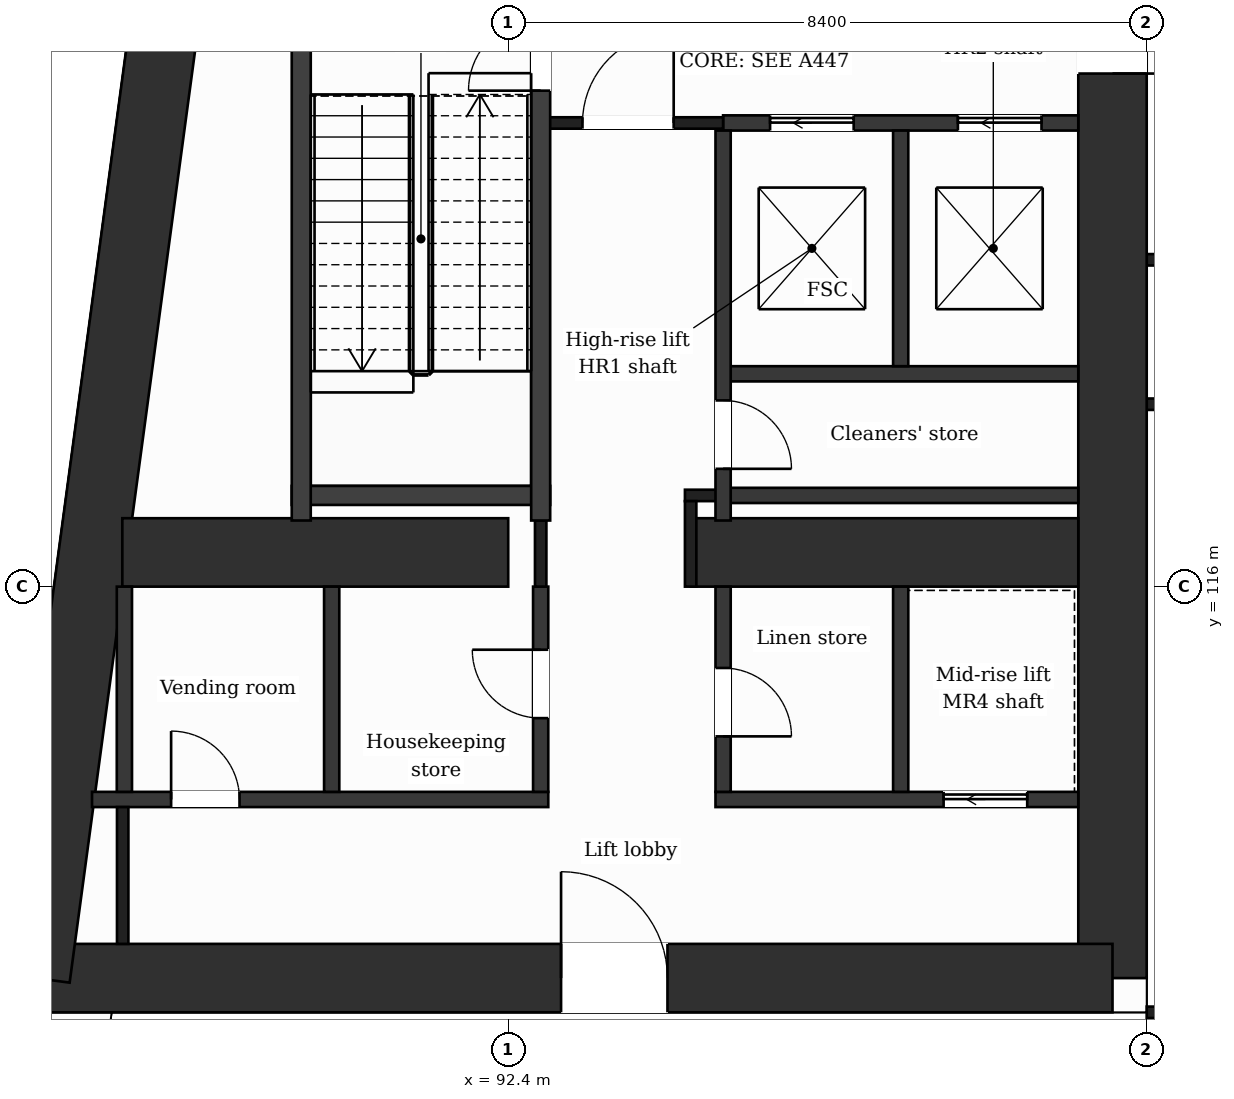
"""IFC4 building model, lengths in metres.
Left out: names, types, materials, properties, quantities, classifications, styles, units other than length and angle.
Written with IfcOpenShell. Run it as: python <this file> out.ifc"""

import sys

from ifc_helpers import new_model, si_unit, direction, frame, frame_2d, origin, place, context, subcontext, project, spatial, rectangle, extrude, element, fill, save


model = new_model("IFC4")
c1 = context("Model", 3, precision=1e-05, world=origin(), true_north=direction((0.0, 1.0)))
c2 = subcontext(c1, "Body", "Model", "MODEL_VIEW")
j1 = project(units=[si_unit("LENGTHUNIT", "METRE"), si_unit("PLANEANGLEUNIT", "RADIAN")], contexts=[c1])
p1 = place(None, origin())
s1 = spatial("IfcSite", under=j1, at=p1, CompositionType="ELEMENT")
p2 = place(p1, origin())
s2 = spatial("IfcBuilding", under=s1, at=p2, CompositionType="ELEMENT")
p3 = place(p2, frame((0.0, 0.0, 192.2)))
s3 = spatial("IfcBuildingStorey", under=s2, at=p3, CompositionType="ELEMENT", Elevation=192.2)
p4 = place(p3, frame((100.35, 131.95, 0.0), z_axis=(0.0, 0.0, 1.0), x_axis=(0.0, -1.0, 0.0)))
e1 = element("IfcWall", 1, at=p4, inside=s3, PredefinedType="SHEAR", context=c2, shape_type="SweptSolid", body=[
    extrude(rectangle(XDim=21.1, YDim=0.9, at=frame_2d((10.55, 0.0))), origin(), (0.0, 0.0, 1.0), 5.0),
])
p5 = place(p4, frame((7.8, 0.0, 0.0)))
e2 = element("IfcOpeningElement", 2, at=p5, cuts=e1, PredefinedType="OPENING", context=c2, shape_type="SweptSolid", body=[
    extrude(rectangle(XDim=1.4, YDim=2.1, at=frame_2d((0.7, 1.05))), frame((0.0, 0.46, 0.0), z_axis=(0.0, -1.0, 0.0), x_axis=(1.0, 0.0, 0.0)), (0.0, 0.0, 1.0), 0.92),
])
p6 = place(p3, frame((100.35, 110.85, 0.0), z_axis=(0.0, 0.0, 1.0), x_axis=(-1.0, 0.0, 0.0)))
e3 = element("IfcWall", 3, at=p6, inside=s3, PredefinedType="SHEAR", context=c2, shape_type="SweptSolid", body=[
    extrude(rectangle(XDim=14.166, YDim=0.9, at=frame_2d((7.083, 0.0))), origin(), (0.0, 0.0, 1.0), 5.0),
])
p7 = place(p6, frame((5.855, 0.0, 0.0)))
e4 = element("IfcOpeningElement", 4, at=p7, cuts=e3, PredefinedType="OPENING", context=c2, shape_type="SweptSolid", body=[
    extrude(rectangle(XDim=1.4, YDim=2.1, at=frame_2d((0.7, 1.05))), frame((0.0, 0.46, 0.0), z_axis=(0.0, -1.0, 0.0), x_axis=(1.0, 0.0, 0.0)), (0.0, 0.0, 1.0), 0.92),
])
p8 = place(p3, frame((86.184, 110.85, 0.0), z_axis=(0.0, 0.0, 1.0), x_axis=(0.133410495943, 0.991060865725, 0.0)))
e5 = element("IfcWall", 5, at=p8, inside=s3, PredefinedType="SHEAR", context=c2, shape_type="SweptSolid", body=[
    extrude(rectangle(XDim=21.29, YDim=0.9, at=frame_2d((10.645, 0.0))), origin(), (0.0, 0.0, 1.0), 5.0),
])
p9 = place(p3, frame((87.323, 116.45, 0.0), z_axis=(0.0, 0.0, 1.0), x_axis=(1.0, 0.0, 0.0)))
e6 = element("IfcWall", 6, at=p9, inside=s3, PredefinedType="SHEAR", context=c2, shape_type="SweptSolid", body=[
    extrude(rectangle(XDim=5.077, YDim=0.9, at=frame_2d((2.539, 0.0))), origin(), (0.0, 0.0, 1.0), 5.0),
])
p10 = place(p3, frame((94.8, 116.45, 0.0), z_axis=(0.0, 0.0, 1.0), x_axis=(1.0, 0.0, 0.0)))
e7 = element("IfcWall", 7, at=p10, inside=s3, PredefinedType="SHEAR", context=c2, shape_type="SweptSolid", body=[
    extrude(rectangle(XDim=5.1, YDim=0.9, at=frame_2d((2.55, 0.0))), origin(), (0.0, 0.0, 1.0), 5.0),
])
p11 = place(p3, frame((100.8, 110.4, 0.0), z_axis=(0.0, 0.0, 1.0), x_axis=(1.0, 0.0, 0.0)))
e8 = element("IfcWall", 8, at=p11, inside=s3, PredefinedType="PARTITIONING", context=c2, shape_type="SweptSolid", body=[
    extrude(rectangle(XDim=4.2, YDim=0.15, at=frame_2d((2.1, 0.0))), origin(), (0.0, 0.0, 1.0), 4.5),
])
p12 = place(p3, frame((86.924, 113.2, 0.0), z_axis=(0.0, 0.0, 1.0), x_axis=(1.0, 0.0, 0.0)))
e9 = element("IfcWall", 9, at=p12, inside=s3, PredefinedType="PARTITIONING", context=c2, shape_type="SweptSolid", body=[
    extrude(rectangle(XDim=6.003, YDim=0.2, at=frame_2d((3.001, 0.0))), origin(), (0.0, 0.0, 1.0), 4.5),
])
p13 = place(p12, frame((1.041, 0.0, 0.0)))
e10 = element("IfcOpeningElement", 10, at=p13, cuts=e9, PredefinedType="OPENING", context=c2, shape_type="SweptSolid", body=[
    extrude(rectangle(XDim=0.9, YDim=2.1, at=frame_2d((0.45, 1.05))), frame((0.0, 0.11, 0.0), z_axis=(0.0, -1.0, 0.0), x_axis=(1.0, 0.0, 0.0)), (0.0, 0.0, 1.0), 0.22),
])
p14 = place(p3, frame((95.127, 113.2, 0.0), z_axis=(0.0, 0.0, 1.0), x_axis=(1.0, 0.0, 0.0)))
e11 = element("IfcWall", 11, at=p14, inside=s3, PredefinedType="PARTITIONING", context=c2, shape_type="SweptSolid", body=[
    extrude(rectangle(XDim=4.773, YDim=0.2, at=frame_2d((2.386, 0.0))), origin(), (0.0, 0.0, 1.0), 4.5),
])
p15 = place(p14, frame((3.001, 0.0, 0.0)))
e12 = element("IfcOpeningElement", 12, at=p15, cuts=e11, PredefinedType="OPENING", context=c2, shape_type="SweptSolid", body=[
    extrude(rectangle(XDim=1.1, YDim=2.1, at=frame_2d((0.55, 1.05))), frame((0.0, 0.11, 0.0), z_axis=(0.0, -1.0, 0.0), x_axis=(1.0, 0.0, 0.0)), (0.0, 0.0, 1.0), 0.22),
])
p16 = place(p3, frame((95.227, 117.2, 0.0), z_axis=(0.0, 0.0, 1.0), x_axis=(1.0, 0.0, 0.0)))
e13 = element("IfcWall", 13, at=p16, inside=s3, PredefinedType="PARTITIONING", context=c2, shape_type="SweptSolid", body=[
    extrude(rectangle(XDim=4.673, YDim=0.2, at=frame_2d((2.336, 0.0))), origin(), (0.0, 0.0, 1.0), 4.5),
])
p17 = place(p3, frame((94.725, 117.2, 0.0), z_axis=(0.0, 0.0, 1.0), x_axis=(1.0, 0.0, 0.0)))
e14 = element("IfcWall", 14, at=p17, inside=s3, PredefinedType="PARTITIONING", context=c2, shape_type="SweptSolid", body=[
    extrude(rectangle(XDim=0.502, YDim=0.15, at=frame_2d((0.251, 0.0))), origin(), (0.0, 0.0, 1.0), 4.5),
])
p18 = place(p3, frame((89.552, 117.2, 0.0), z_axis=(0.0, 0.0, 1.0), x_axis=(1.0, 0.0, 0.0)))
e15 = element("IfcWall", 15, at=p18, inside=s3, PredefinedType="PARTITIONING", context=c2, shape_type="SweptSolid", body=[
    extrude(rectangle(XDim=3.4, YDim=0.25, at=frame_2d((1.7, 0.0))), origin(), (0.0, 0.0, 1.0), 4.5),
])
p19 = place(p3, frame((100.8, 118.4, 0.0), z_axis=(0.0, 0.0, 1.0), x_axis=(1.0, 0.0, 0.0)))
e16 = element("IfcWall", 16, at=p19, inside=s3, PredefinedType="PARTITIONING", context=c2, shape_type="SweptSolid", body=[
    extrude(rectangle(XDim=4.275, YDim=0.15, at=frame_2d((2.137, 0.0))), origin(), (0.0, 0.0, 1.0), 4.5),
])
p20 = place(p3, frame((95.227, 118.8, 0.0), z_axis=(0.0, 0.0, 1.0), x_axis=(1.0, 0.0, 0.0)))
e17 = element("IfcWall", 17, at=p20, inside=s3, PredefinedType="PARTITIONING", context=c2, shape_type="SweptSolid", body=[
    extrude(rectangle(XDim=4.673, YDim=0.2, at=frame_2d((2.336, 0.0))), origin(), (0.0, 0.0, 1.0), 4.5),
])
p21 = place(p3, frame((100.8, 120.3, 0.0), z_axis=(0.0, 0.0, 1.0), x_axis=(1.0, 0.0, 0.0)))
e18 = element("IfcWall", 18, at=p21, inside=s3, PredefinedType="PARTITIONING", context=c2, shape_type="SweptSolid", body=[
    extrude(rectangle(XDim=7.275, YDim=0.15, at=frame_2d((3.637, 0.0))), origin(), (0.0, 0.0, 1.0), 4.5),
])
p22 = place(p21, frame((3.0, 0.0, 0.0)))
e19 = element("IfcOpeningElement", 19, at=p22, cuts=e18, PredefinedType="OPENING", context=c2, shape_type="SweptSolid", body=[
    extrude(rectangle(XDim=1.2, YDim=2.1, at=frame_2d((0.6, 1.05))), frame((0.0, 0.085, 0.0), z_axis=(0.0, -1.0, 0.0), x_axis=(1.0, 0.0, 0.0)), (0.0, 0.0, 1.0), 0.17),
])
p23 = place(p3, frame((95.227, 122.1, 0.0), z_axis=(0.0, 0.0, 1.0), x_axis=(1.0, 0.0, 0.0)))
e20 = element("IfcWall", 20, at=p23, inside=s3, PredefinedType="PARTITIONING", context=c2, shape_type="SweptSolid", body=[
    extrude(rectangle(XDim=4.673, YDim=0.2, at=frame_2d((2.336, 0.0))), origin(), (0.0, 0.0, 1.0), 4.5),
])
p24 = place(p23, frame((0.618, 0.0, 0.0)))
e21 = element("IfcOpeningElement", 21, at=p24, cuts=e20, PredefinedType="OPENING", context=c2, shape_type="SweptSolid", body=[
    extrude(rectangle(XDim=1.1, YDim=2.1, at=frame_2d((0.55, 1.05))), frame((0.0, 0.11, 0.0), z_axis=(0.0, -1.0, 0.0), x_axis=(1.0, 0.0, 0.0)), (0.0, 0.0, 1.0), 0.22),
])
p25 = place(p23, frame((3.089, 0.0, 0.0)))
e22 = element("IfcOpeningElement", 22, at=p25, cuts=e20, PredefinedType="OPENING", context=c2, shape_type="SweptSolid", body=[
    extrude(rectangle(XDim=1.1, YDim=2.1, at=frame_2d((0.55, 1.05))), frame((0.0, 0.11, 0.0), z_axis=(0.0, -1.0, 0.0), x_axis=(1.0, 0.0, 0.0)), (0.0, 0.0, 1.0), 0.22),
])
p26 = place(p3, frame((92.827, 122.1, 0.0), z_axis=(0.0, 0.0, 1.0), x_axis=(1.0, 0.0, 0.0)))
e23 = element("IfcWall", 23, at=p26, inside=s3, PredefinedType="PARTITIONING", context=c2, shape_type="SweptSolid", body=[
    extrude(rectangle(XDim=2.4, YDim=0.15, at=frame_2d((1.2, 0.0))), origin(), (0.0, 0.0, 1.0), 4.5),
])
p27 = place(p26, frame((0.55, 0.0, 0.0)))
e24 = element("IfcOpeningElement", 24, at=p27, cuts=e23, PredefinedType="OPENING", context=c2, shape_type="SweptSolid", body=[
    extrude(rectangle(XDim=1.2, YDim=2.1, at=frame_2d((0.6, 1.05))), frame((0.0, 0.085, 0.0), z_axis=(0.0, -1.0, 0.0), x_axis=(1.0, 0.0, 0.0)), (0.0, 0.0, 1.0), 0.17),
])
p28 = place(p3, frame((87.35, 113.3, 0.0), z_axis=(0.0, 0.0, 1.0), x_axis=(0.0, 1.0, 0.0)))
e25 = element("IfcWall", 25, at=p28, inside=s3, PredefinedType="PARTITIONING", context=c2, shape_type="SweptSolid", body=[
    extrude(rectangle(XDim=2.7, YDim=0.2, at=frame_2d((1.35, 0.0))), origin(), (0.0, 0.0, 1.0), 4.5),
])
p29 = place(p3, frame((87.328, 111.3, 0.0), z_axis=(0.0, 0.0, 1.0), x_axis=(0.0, 1.0, 0.0)))
e26 = element("IfcWall", 26, at=p29, inside=s3, PredefinedType="PARTITIONING", context=c2, shape_type="SweptSolid", body=[
    extrude(rectangle(XDim=1.8, YDim=0.15, at=frame_2d((0.9, 0.0))), origin(), (0.0, 0.0, 1.0), 4.5),
])
p30 = place(p3, frame((89.677, 116.87, 0.0), z_axis=(0.0, 0.0, 1.0), x_axis=(0.0, 1.0, 0.0)))
e27 = element("IfcWall", 27, at=p30, inside=s3, PredefinedType="PARTITIONING", context=c2, shape_type="SweptSolid", body=[
    extrude(rectangle(XDim=6.955, YDim=0.25, at=frame_2d((3.478, 0.0))), origin(), (0.0, 0.0, 1.0), 4.5),
])
p31 = place(p3, frame((90.077, 113.3, 0.0), z_axis=(0.0, 0.0, 1.0), x_axis=(0.0, 1.0, 0.0)))
e28 = element("IfcWall", 28, at=p31, inside=s3, PredefinedType="PARTITIONING", context=c2, shape_type="SweptSolid", body=[
    extrude(rectangle(XDim=2.7, YDim=0.2, at=frame_2d((1.35, 0.0))), origin(), (0.0, 0.0, 1.0), 4.5),
])
p32 = place(p3, frame((92.827, 113.3, 0.0), z_axis=(0.0, 0.0, 1.0), x_axis=(0.0, 1.0, 0.0)))
e29 = element("IfcWall", 29, at=p32, inside=s3, PredefinedType="PARTITIONING", context=c2, shape_type="SweptSolid", body=[
    extrude(rectangle(XDim=2.7, YDim=0.2, at=frame_2d((1.35, 0.0))), origin(), (0.0, 0.0, 1.0), 4.5),
])
p33 = place(p32, frame((0.97, 0.0, 0.0)))
e30 = element("IfcOpeningElement", 30, at=p33, cuts=e29, PredefinedType="OPENING", context=c2, shape_type="SweptSolid", body=[
    extrude(rectangle(XDim=0.9, YDim=2.1, at=frame_2d((0.45, 1.05))), frame((0.0, 0.11, 0.0), z_axis=(0.0, -1.0, 0.0), x_axis=(1.0, 0.0, 0.0)), (0.0, 0.0, 1.0), 0.22),
])
p34 = place(p3, frame((92.827, 116.0, 0.0), z_axis=(0.0, 0.0, 1.0), x_axis=(0.0, 1.0, 0.0)))
e31 = element("IfcWall", 31, at=p34, inside=s3, PredefinedType="PARTITIONING", context=c2, shape_type="SweptSolid", body=[
    extrude(rectangle(XDim=0.87, YDim=0.15, at=frame_2d((0.435, 0.0))), origin(), (0.0, 0.0, 1.0), 4.5),
])
p35 = place(p3, frame((92.827, 116.87, 0.0), z_axis=(0.0, 0.0, 1.0), x_axis=(0.0, 1.0, 0.0)))
e32 = element("IfcWall", 32, at=p35, inside=s3, PredefinedType="PARTITIONING", context=c2, shape_type="SweptSolid", body=[
    extrude(rectangle(XDim=6.955, YDim=0.25, at=frame_2d((3.478, 0.0))), origin(), (0.0, 0.0, 1.0), 4.5),
])
p36 = place(p35, frame((5.655, 0.0, 0.0)))
e33 = element("IfcOpeningElement", 33, at=p36, cuts=e32, PredefinedType="OPENING", context=c2, shape_type="SweptSolid", body=[
    extrude(rectangle(XDim=0.95, YDim=2.1, at=frame_2d((0.475, 1.05))), frame((0.0, 0.135, 0.0), z_axis=(0.0, -1.0, 0.0), x_axis=(1.0, 0.0, 0.0)), (0.0, 0.0, 1.0), 0.27),
])
p37 = place(p3, frame((94.8, 116.0, 0.0), z_axis=(0.0, 0.0, 1.0), x_axis=(0.0, 1.0, 0.0)))
e34 = element("IfcWall", 34, at=p37, inside=s3, PredefinedType="PARTITIONING", context=c2, shape_type="SweptSolid", body=[
    extrude(rectangle(XDim=1.125, YDim=0.15, at=frame_2d((0.562, 0.0))), origin(), (0.0, 0.0, 1.0), 4.5),
])
p38 = place(p3, frame((95.227, 113.3, 0.0), z_axis=(0.0, 0.0, 1.0), x_axis=(0.0, 1.0, 0.0)))
e35 = element("IfcWall", 35, at=p38, inside=s3, PredefinedType="PARTITIONING", context=c2, shape_type="SweptSolid", body=[
    extrude(rectangle(XDim=2.7, YDim=0.2, at=frame_2d((1.35, 0.0))), origin(), (0.0, 0.0, 1.0), 4.5),
])
p39 = place(p38, frame((0.73, 0.0, 0.0)))
e36 = element("IfcOpeningElement", 36, at=p39, cuts=e35, PredefinedType="OPENING", context=c2, shape_type="SweptSolid", body=[
    extrude(rectangle(XDim=0.9, YDim=2.1, at=frame_2d((0.45, 1.05))), frame((0.0, 0.11, 0.0), z_axis=(0.0, -1.0, 0.0), x_axis=(1.0, 0.0, 0.0)), (0.0, 0.0, 1.0), 0.22),
])
p40 = place(p3, frame((95.227, 116.87, 0.0), z_axis=(0.0, 0.0, 1.0), x_axis=(0.0, 1.0, 0.0)))
e37 = element("IfcWall", 37, at=p40, inside=s3, PredefinedType="PARTITIONING", context=c2, shape_type="SweptSolid", body=[
    extrude(rectangle(XDim=5.13, YDim=0.2, at=frame_2d((2.565, 0.0))), origin(), (0.0, 0.0, 1.0), 4.5),
])
p41 = place(p40, frame((0.68, 0.0, 0.0)))
e38 = element("IfcOpeningElement", 38, at=p41, cuts=e37, PredefinedType="OPENING", context=c2, shape_type="SweptSolid", body=[
    extrude(rectangle(XDim=0.9, YDim=2.1, at=frame_2d((0.45, 1.05))), frame((0.0, 0.11, 0.0), z_axis=(0.0, -1.0, 0.0), x_axis=(1.0, 0.0, 0.0)), (0.0, 0.0, 1.0), 0.22),
])
p42 = place(p3, frame((97.563, 113.3, 0.0), z_axis=(0.0, 0.0, 1.0), x_axis=(0.0, 1.0, 0.0)))
e39 = element("IfcWall", 39, at=p42, inside=s3, PredefinedType="PARTITIONING", context=c2, shape_type="SweptSolid", body=[
    extrude(rectangle(XDim=2.7, YDim=0.2, at=frame_2d((1.35, 0.0))), origin(), (0.0, 0.0, 1.0), 4.5),
])
p43 = place(p3, frame((97.563, 118.9, 0.0), z_axis=(0.0, 0.0, 1.0), x_axis=(0.0, 1.0, 0.0)))
e40 = element("IfcWall", 40, at=p43, inside=s3, PredefinedType="PARTITIONING", context=c2, shape_type="SweptSolid", body=[
    extrude(rectangle(XDim=3.1, YDim=0.2, at=frame_2d((1.55, 0.0))), origin(), (0.0, 0.0, 1.0), 4.5),
])
p44 = place(p27, origin())
e41 = element("IfcDoor", 41, at=p44, inside=s3, OperationType="SINGLE_SWING_RIGHT", PredefinedType="DOOR", context=c2, shape_type="SweptSolid", body=[
    extrude(rectangle(XDim=1.2, YDim=2.1, at=frame_2d((0.6, 1.05))), frame((0.0, 0.025, 0.0), z_axis=(0.0, -1.0, 0.0), x_axis=(1.0, 0.0, 0.0)), (0.0, 0.0, 1.0), 0.05),
])
fill(e24, e41)
p45 = place(p24, origin())
e42 = element("IfcDoor", 42, at=p45, inside=s3, OperationType="SLIDING_TO_LEFT", PredefinedType="DOOR", context=c2, shape_type="SweptSolid", body=[
    extrude(rectangle(XDim=1.1, YDim=2.1, at=frame_2d((0.55, 1.05))), frame((0.0, 0.025, 0.0), z_axis=(0.0, -1.0, 0.0), x_axis=(1.0, 0.0, 0.0)), (0.0, 0.0, 1.0), 0.05),
])
fill(e21, e42)
p46 = place(p25, origin())
e43 = element("IfcDoor", 43, at=p46, inside=s3, OperationType="SLIDING_TO_LEFT", PredefinedType="DOOR", context=c2, shape_type="SweptSolid", body=[
    extrude(rectangle(XDim=1.1, YDim=2.1, at=frame_2d((0.55, 1.05))), frame((0.0, 0.025, 0.0), z_axis=(0.0, -1.0, 0.0), x_axis=(1.0, 0.0, 0.0)), (0.0, 0.0, 1.0), 0.05),
])
fill(e22, e43)
p47 = place(p36, origin())
e44 = element("IfcDoor", 44, at=p47, inside=s3, OperationType="SINGLE_SWING_LEFT", PredefinedType="DOOR", context=c2, shape_type="SweptSolid", body=[
    extrude(rectangle(XDim=0.95, YDim=2.1, at=frame_2d((0.475, 1.05))), frame((0.0, 0.025, 0.0), z_axis=(0.0, -1.0, 0.0), x_axis=(1.0, 0.0, 0.0)), (0.0, 0.0, 1.0), 0.05),
])
fill(e33, e44)
p48 = place(p41, origin())
e45 = element("IfcDoor", 45, at=p48, inside=s3, OperationType="SINGLE_SWING_LEFT", PredefinedType="DOOR", context=c2, shape_type="SweptSolid", body=[
    extrude(rectangle(XDim=0.9, YDim=2.1, at=frame_2d((0.45, 1.05))), frame((0.0, 0.025, 0.0), z_axis=(0.0, -1.0, 0.0), x_axis=(1.0, 0.0, 0.0)), (0.0, 0.0, 1.0), 0.05),
])
fill(e38, e45)
p49 = place(p15, origin())
e46 = element("IfcDoor", 46, at=p49, inside=s3, OperationType="SLIDING_TO_LEFT", PredefinedType="DOOR", context=c2, shape_type="SweptSolid", body=[
    extrude(rectangle(XDim=1.1, YDim=2.1, at=frame_2d((0.55, 1.05))), frame((0.0, 0.025, 0.0), z_axis=(0.0, -1.0, 0.0), x_axis=(1.0, 0.0, 0.0)), (0.0, 0.0, 1.0), 0.05),
])
fill(e12, e46)
p50 = place(p13, origin())
e47 = element("IfcDoor", 47, at=p50, inside=s3, OperationType="SINGLE_SWING_LEFT", PredefinedType="DOOR", context=c2, shape_type="SweptSolid", body=[
    extrude(rectangle(XDim=0.9, YDim=2.1, at=frame_2d((0.45, 1.05))), frame((0.0, 0.025, 0.0), z_axis=(0.0, -1.0, 0.0), x_axis=(1.0, 0.0, 0.0)), (0.0, 0.0, 1.0), 0.05),
])
fill(e10, e47)
p51 = place(p33, origin())
e48 = element("IfcDoor", 48, at=p51, inside=s3, OperationType="SINGLE_SWING_RIGHT", PredefinedType="DOOR", context=c2, shape_type="SweptSolid", body=[
    extrude(rectangle(XDim=0.9, YDim=2.1, at=frame_2d((0.45, 1.05))), frame((0.0, 0.025, 0.0), z_axis=(0.0, -1.0, 0.0), x_axis=(1.0, 0.0, 0.0)), (0.0, 0.0, 1.0), 0.05),
])
fill(e30, e48)
p52 = place(p39, origin())
e49 = element("IfcDoor", 49, at=p52, inside=s3, OperationType="SINGLE_SWING_LEFT", PredefinedType="DOOR", context=c2, shape_type="SweptSolid", body=[
    extrude(rectangle(XDim=0.9, YDim=2.1, at=frame_2d((0.45, 1.05))), frame((0.0, 0.025, 0.0), z_axis=(0.0, -1.0, 0.0), x_axis=(1.0, 0.0, 0.0)), (0.0, 0.0, 1.0), 0.05),
])
fill(e36, e49)
p53 = place(p7, origin())
e50 = element("IfcDoor", 50, at=p53, inside=s3, OperationType="SINGLE_SWING_RIGHT", PredefinedType="DOOR", context=c2, shape_type="SweptSolid", body=[
    extrude(rectangle(XDim=1.4, YDim=2.1, at=frame_2d((0.7, 1.05))), frame((0.0, 0.025, 0.0), z_axis=(0.0, -1.0, 0.0), x_axis=(1.0, 0.0, 0.0)), (0.0, 0.0, 1.0), 0.05),
])
fill(e4, e50)
p54 = place(p5, origin())
e51 = element("IfcDoor", 51, at=p54, inside=s3, OperationType="SINGLE_SWING_RIGHT", PredefinedType="DOOR", context=c2, shape_type="SweptSolid", body=[
    extrude(rectangle(XDim=1.4, YDim=2.1, at=frame_2d((0.7, 1.05))), frame((0.0, 0.025, 0.0), z_axis=(0.0, -1.0, 0.0), x_axis=(1.0, 0.0, 0.0)), (0.0, 0.0, 1.0), 0.05),
])
fill(e2, e51)
save(model, sys.argv[1])
